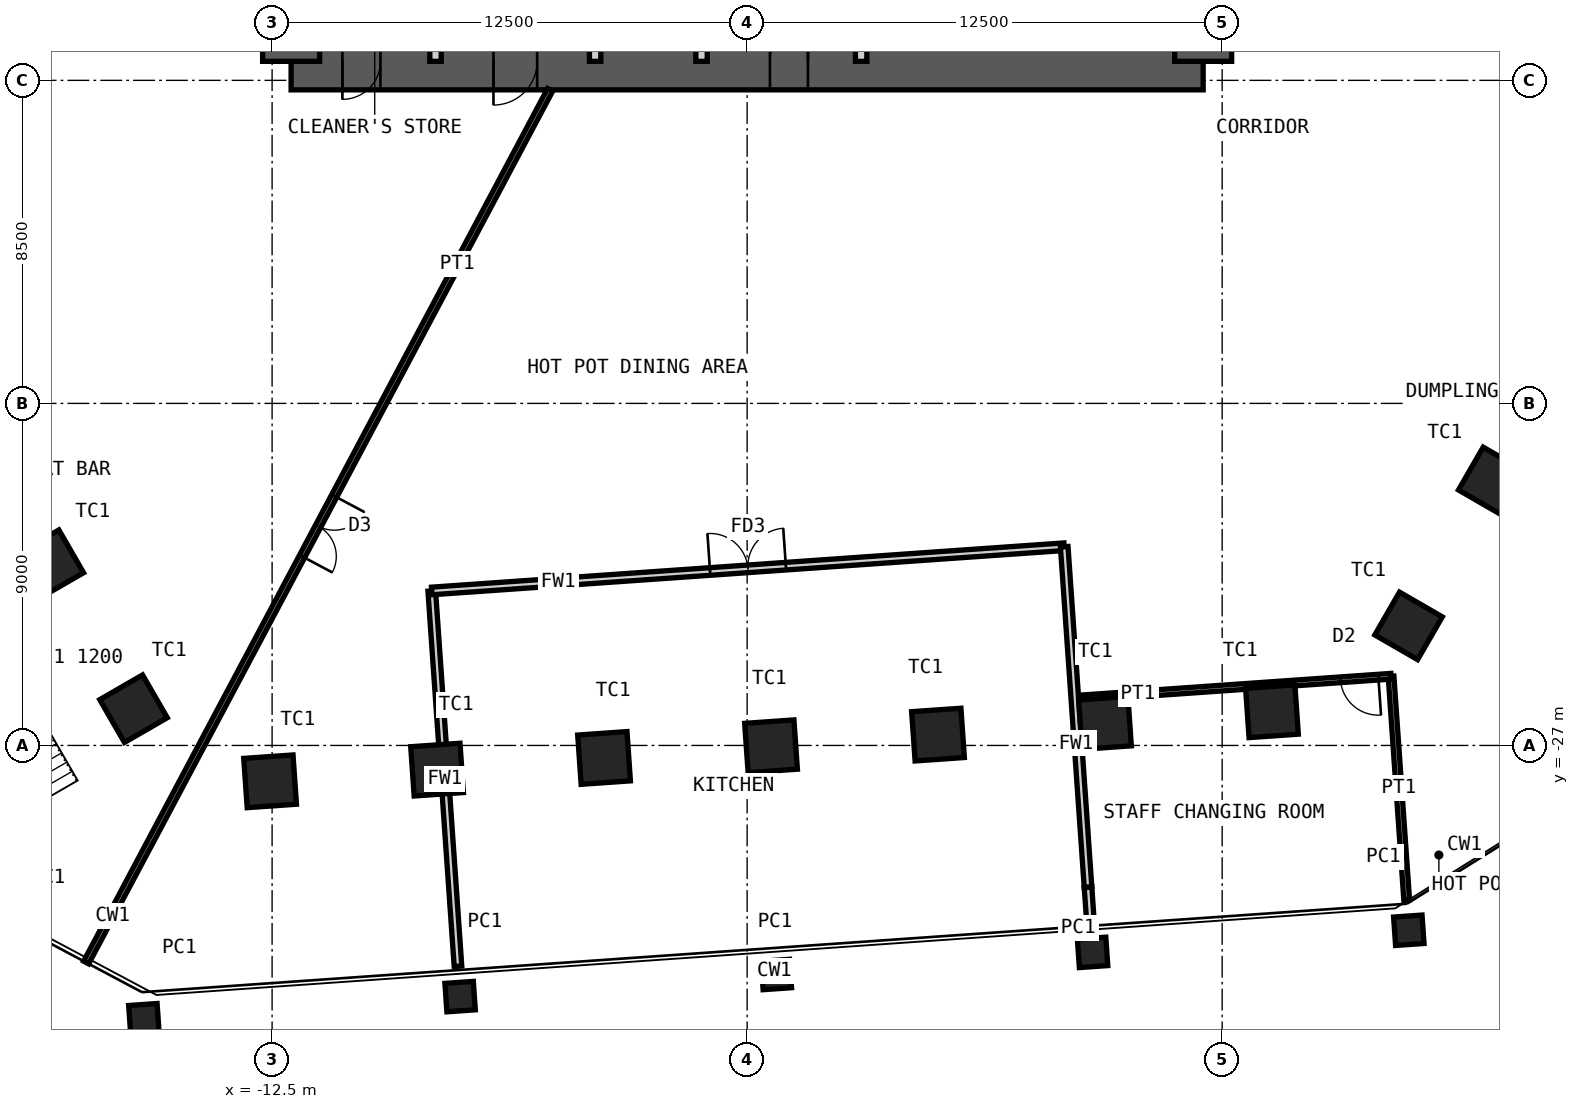
"""IFC4 building model, lengths in metres.
Left out: names, types, materials, properties, quantities, classifications, styles, units other than length and angle.
Written with IfcOpenShell. Run it as: python <this file> out.ifc"""

import sys

from ifc_helpers import new_model, si_unit, direction, frame, frame_2d, origin, origin_2d, place, context, subcontext, project, spatial, rectangle, hollow_rectangle, extrude, element, fill, save


model = new_model("IFC4")
c1 = context("Model", 3, precision=1e-05, world=origin(), true_north=direction((0.0, 1.0)))
c2 = subcontext(c1, "Body", "Model", "MODEL_VIEW")
j1 = project(units=[si_unit("LENGTHUNIT", "METRE"), si_unit("PLANEANGLEUNIT", "RADIAN")], contexts=[c1])
p1 = place(None, origin())
s1 = spatial("IfcSite", under=j1, at=p1, CompositionType="ELEMENT")
p2 = place(p1, origin())
s2 = spatial("IfcBuilding", under=s1, at=p2, CompositionType="ELEMENT")
p3 = place(p2, frame((0.0, 0.0, 6.0)))
s3 = spatial("IfcBuildingStorey", under=s2, at=p3, CompositionType="ELEMENT", Elevation=6.0)
for number, where, z_axis, x_axis in (
    (1, (19.607, -20.04, 0.0), (0.0, 0.0, 1.0), (0.5, 0.866, 0.0)),
    (2, (17.405, -23.854, 0.0), (0.0, 0.0, 1.0), (0.5, 0.866, 0.0)),
    (3, (13.811, -26.1, 0.0), (0.0, 0.0, 1.0), (0.998, 0.07, 0.0)),
    (4, (9.417, -26.407, 0.0), (0.0, 0.0, 1.0), (0.998, 0.07, 0.0)),
    (5, (5.023, -26.715, 0.0), (0.0, 0.0, 1.0), (0.998, 0.07, 0.0)),
    (6, (0.629, -27.022, 0.0), (0.0, 0.0, 1.0), (0.998, 0.07, 0.0)),
    (7, (-3.765, -27.329, 0.0), (0.0, 0.0, 1.0), (0.998, 0.07, 0.0)),
    (8, (-8.159, -27.636, 0.0), (0.0, 0.0, 1.0), (0.998, 0.07, 0.0)),
    (9, (-12.553, -27.944, 0.0), (0.0, 0.0, 1.0), (0.998, 0.07, 0.0)),
    (10, (-16.147, -26.033, 0.0), (0.0, 0.0, 1.0), (0.5, -0.866, 0.0)),
    (11, (-18.349, -22.218, 0.0), (0.0, 0.0, 1.0), (0.5, -0.866, 0.0)),
):
    element("IfcColumn", number, at=place(p3, frame(where, z_axis=z_axis, x_axis=x_axis)), inside=s3, PredefinedType="COLUMN", context=c2, shape_type="SweptSolid", body=[
        extrude(hollow_rectangle(XDim=1.3, YDim=1.3, WallThickness=0.1, at=origin_2d()), origin(), (0.0, 0.0, 1.0), 6.0),
    ])
for number, where, z_axis, x_axis in (
    (12, (17.411, -31.863, 0.0), (0.0, 0.0, 1.0), (0.998, 0.07, 0.0)),
    (13, (9.09, -32.445, 0.0), (0.0, 0.0, 1.0), (0.998, 0.07, 0.0)),
    (14, (0.769, -33.027, 0.0), (0.0, 0.0, 1.0), (0.998, 0.07, 0.0)),
    (15, (-7.553, -33.609, 0.0), (0.0, 0.0, 1.0), (0.998, 0.07, 0.0)),
    (16, (-15.874, -34.191, 0.0), (0.0, 0.0, 1.0), (0.998, 0.07, 0.0)),
):
    element("IfcColumn", number, at=place(p3, frame(where, z_axis=z_axis, x_axis=x_axis)), inside=s3, PredefinedType="COLUMN", context=c2, shape_type="SweptSolid", body=[
        extrude(hollow_rectangle(XDim=0.75, YDim=0.75, WallThickness=0.036, at=origin_2d()), origin(), (0.0, 0.0, 1.0), 6.0),
    ])
p4 = place(p3, frame((-12.0, -9.0, 0.0), z_axis=(0.0, 0.0, 1.0), x_axis=(1.0, 0.0, 0.0)))
e17 = element("IfcWall", 17, at=p4, inside=s3, PredefinedType="SHEAR", context=c2, shape_type="SweptSolid", body=[
    extrude(rectangle(XDim=24.0, YDim=1.5, at=frame_2d((12.0, 0.0))), origin(), (0.0, 0.0, 1.0), 6.0),
])
p5 = place(p4, frame((1.35, 0.0, 0.0)))
e18 = element("IfcOpeningElement", 18, at=p5, cuts=e17, PredefinedType="OPENING", context=c2, shape_type="SweptSolid", body=[
    extrude(rectangle(XDim=1.0, YDim=2.1, at=frame_2d((0.5, 1.05))), frame((0.0, 0.76, 0.0), z_axis=(0.0, -1.0, 0.0), x_axis=(1.0, 0.0, 0.0)), (0.0, 0.0, 1.0), 1.52),
])
p6 = place(p4, frame((5.325, 0.0, 0.0)))
e19 = element("IfcOpeningElement", 19, at=p6, cuts=e17, PredefinedType="OPENING", context=c2, shape_type="SweptSolid", body=[
    extrude(rectangle(XDim=1.15, YDim=2.1, at=frame_2d((0.575, 1.05))), frame((0.0, 0.76, 0.0), z_axis=(0.0, -1.0, 0.0), x_axis=(1.0, 0.0, 0.0)), (0.0, 0.0, 1.0), 1.52),
])
p7 = place(p4, frame((12.6, 0.0, 0.0)))
e20 = element("IfcOpeningElement", 20, at=p7, cuts=e17, PredefinedType="OPENING", context=c2, shape_type="SweptSolid", body=[
    extrude(rectangle(XDim=1.0, YDim=2.1, at=frame_2d((0.5, 1.05))), frame((0.0, 0.76, 0.0), z_axis=(0.0, -1.0, 0.0), x_axis=(1.0, 0.0, 0.0)), (0.0, 0.0, 1.0), 1.52),
])
p8 = place(p3, frame((12.0, -9.0, 0.0), z_axis=(0.0, 0.0, 1.0), x_axis=(0.0, 1.0, 0.0)))
e21 = element("IfcWall", 21, at=p8, inside=s3, PredefinedType="SHEAR", context=c2, shape_type="SweptSolid", body=[
    extrude(rectangle(XDim=18.0, YDim=1.5, at=frame_2d((9.0, 0.0))), origin(), (0.0, 0.0, 1.0), 6.0),
])
p9 = place(p8, frame((8.1, 0.0, 0.0)))
e22 = element("IfcOpeningElement", 22, at=p9, cuts=e21, PredefinedType="OPENING", context=c2, shape_type="SweptSolid", body=[
    extrude(rectangle(XDim=1.8, YDim=2.1, at=frame_2d((0.9, 1.05))), frame((0.0, 0.76, 0.0), z_axis=(0.0, -1.0, 0.0), x_axis=(1.0, 0.0, 0.0)), (0.0, 0.0, 1.0), 1.52),
])
p10 = place(p3, frame((-12.0, -9.0, 0.0), z_axis=(0.0, 0.0, 1.0), x_axis=(0.0, 1.0, 0.0)))
e23 = element("IfcWall", 23, at=p10, inside=s3, PredefinedType="SHEAR", context=c2, shape_type="SweptSolid", body=[
    extrude(rectangle(XDim=18.0, YDim=1.5, at=frame_2d((9.0, 0.0))), origin(), (0.0, 0.0, 1.0), 6.0),
])
p11 = place(p10, frame((8.1, 0.0, 0.0)))
e24 = element("IfcOpeningElement", 24, at=p11, cuts=e23, PredefinedType="OPENING", context=c2, shape_type="SweptSolid", body=[
    extrude(rectangle(XDim=1.8, YDim=2.1, at=frame_2d((0.9, 1.05))), frame((0.0, 0.76, 0.0), z_axis=(0.0, -1.0, 0.0), x_axis=(1.0, 0.0, 0.0)), (0.0, 0.0, 1.0), 1.52),
])
for number, where, z_axis, x_axis in (
    (25, (-8.2, -9.0, 0.0), (0.0, 0.0, 1.0), (0.0, 1.0, 0.0)),
    (26, (-4.0, -9.0, 0.0), (0.0, 0.0, 1.0), (0.0, 1.0, 0.0)),
):
    element("IfcWall", number, at=place(p3, frame(where, z_axis=z_axis, x_axis=x_axis)), inside=s3, PredefinedType="PARTITIONING", context=c2, shape_type="SweptSolid", body=[
        extrude(rectangle(XDim=3.85, YDim=0.3, at=frame_2d((1.925, 0.0))), origin(), (0.0, 0.0, 1.0), 5.78),
    ])
p12 = place(p3, frame((-1.2, -9.0, 0.0), z_axis=(0.0, 0.0, 1.0), x_axis=(0.0, 1.0, 0.0)))
e27 = element("IfcWall", 27, at=p12, inside=s3, PredefinedType="PARTITIONING", context=c2, shape_type="SweptSolid", body=[
    extrude(rectangle(XDim=3.85, YDim=0.3, at=frame_2d((1.925, 0.0))), origin(), (0.0, 0.0, 1.0), 5.78),
])
p13 = place(p12, frame((1.375, 0.0, 0.0)))
e28 = element("IfcOpeningElement", 28, at=p13, cuts=e27, PredefinedType="OPENING", context=c2, shape_type="SweptSolid", body=[
    extrude(rectangle(XDim=1.1, YDim=2.4, at=frame_2d((0.55, 1.2))), frame((0.0, 0.16, 0.0), z_axis=(0.0, -1.0, 0.0), x_axis=(1.0, 0.0, 0.0)), (0.0, 0.0, 1.0), 0.32),
])
p14 = place(p3, frame((3.0, -9.0, 0.0), z_axis=(0.0, 0.0, 1.0), x_axis=(0.0, 1.0, 0.0)))
e29 = element("IfcWall", 29, at=p14, inside=s3, PredefinedType="PARTITIONING", context=c2, shape_type="SweptSolid", body=[
    extrude(rectangle(XDim=3.85, YDim=0.3, at=frame_2d((1.925, 0.0))), origin(), (0.0, 0.0, 1.0), 5.78),
])
p15 = place(p14, frame((1.425, 0.0, 0.0)))
e30 = element("IfcOpeningElement", 30, at=p15, cuts=e29, PredefinedType="OPENING", context=c2, shape_type="SweptSolid", body=[
    extrude(rectangle(XDim=1.0, YDim=2.1, at=frame_2d((0.5, 1.05))), frame((0.0, 0.16, 0.0), z_axis=(0.0, -1.0, 0.0), x_axis=(1.0, 0.0, 0.0)), (0.0, 0.0, 1.0), 0.32),
])
p16 = place(p3, frame((9.034, -31.647, 0.0), z_axis=(0.0, 0.0, 1.0), x_axis=(-0.069837025026, 0.997558414297, 0.0)))
e31 = element("IfcWall", 31, at=p16, inside=s3, PredefinedType="PARTITIONING", context=c2, shape_type="SweptSolid", body=[
    extrude(rectangle(XDim=0.923, YDim=0.2, at=frame_2d((0.461, 0.0))), origin(), (0.0, 0.0, 1.0), 4.65),
])
p17 = place(p3, frame((-7.609, -32.811, 0.0), z_axis=(0.0, 0.0, 1.0), x_axis=(-0.069764341483, 0.997563500063, 0.0)))
e32 = element("IfcWall", 32, at=p17, inside=s3, PredefinedType="PARTITIONING", context=c2, shape_type="SweptSolid", body=[
    extrude(rectangle(XDim=9.9, YDim=0.2, at=frame_2d((4.95, 0.0))), origin(), (0.0, 0.0, 1.0), 5.75),
])
p18 = place(p3, frame((8.344, -21.771, 0.0), z_axis=(0.0, 0.0, 1.0), x_axis=(-0.997563959397, -0.069757773133, 0.0)))
e33 = element("IfcWall", 33, at=p18, inside=s3, PredefinedType="PARTITIONING", context=c2, shape_type="SweptSolid", body=[
    extrude(rectangle(XDim=16.684, YDim=0.2, at=frame_2d((8.342, 0.0))), origin(), (0.0, 0.0, 1.0), 5.75),
])
p19 = place(p18, frame((7.342, 0.0, 0.0)))
e34 = element("IfcOpeningElement", 34, at=p19, cuts=e33, PredefinedType="OPENING", context=c2, shape_type="SweptSolid", body=[
    extrude(rectangle(XDim=2.0, YDim=2.4, at=frame_2d((1.0, 1.2))), frame((0.0, 0.11, 0.0), z_axis=(0.0, -1.0, 0.0), x_axis=(1.0, 0.0, 0.0)), (0.0, 0.0, 1.0), 0.22),
])
p20 = place(p3, frame((17.356, -31.065, 0.0), z_axis=(0.0, 0.0, 1.0), x_axis=(-0.069767771051, 0.997563260211, 0.0)))
e35 = element("IfcWall", 35, at=p20, inside=s3, PredefinedType="PARTITIONING", context=c2, shape_type="SweptSolid", body=[
    extrude(rectangle(XDim=5.9, YDim=0.15, at=frame_2d((2.95, 0.0))), origin(), (0.0, 0.0, 1.0), 5.75),
])
p21 = place(p3, frame((16.944, -25.179, 0.0), z_axis=(0.0, 0.0, 1.0), x_axis=(-0.997564977604, -0.069743210844, 0.0)))
e36 = element("IfcWall", 36, at=p21, inside=s3, PredefinedType="PARTITIONING", context=c2, shape_type="SweptSolid", body=[
    extrude(rectangle(XDim=8.342, YDim=0.15, at=frame_2d((4.171, 0.0))), origin(), (0.0, 0.0, 1.0), 5.75),
])
p22 = place(p21, frame((0.334, 0.0, 0.0)))
e37 = element("IfcOpeningElement", 37, at=p22, cuts=e36, PredefinedType="OPENING", context=c2, shape_type="SweptSolid", body=[
    extrude(rectangle(XDim=1.0, YDim=2.4, at=frame_2d((0.5, 1.2))), frame((0.0, 0.085, 0.0), z_axis=(0.0, -1.0, 0.0), x_axis=(1.0, 0.0, 0.0)), (0.0, 0.0, 1.0), 0.17),
])
p23 = place(p3, frame((-5.184, -9.75, 0.0), z_axis=(0.0, 0.0, 1.0), x_axis=(-0.469477354847, -0.882944513141, 0.0)))
e38 = element("IfcWall", 38, at=p23, inside=s3, PredefinedType="PARTITIONING", context=c2, shape_type="SweptSolid", body=[
    extrude(rectangle(XDim=26.005, YDim=0.15, at=frame_2d((13.002, 0.0))), origin(), (0.0, 0.0, 1.0), 5.75),
])
p24 = place(p23, frame((12.103, 0.0, 0.0)))
e39 = element("IfcOpeningElement", 39, at=p24, cuts=e38, PredefinedType="OPENING", context=c2, shape_type="SweptSolid", body=[
    extrude(rectangle(XDim=1.8, YDim=2.4, at=frame_2d((0.9, 1.2))), frame((0.0, 0.085, 0.0), z_axis=(0.0, -1.0, 0.0), x_axis=(1.0, 0.0, 0.0)), (0.0, 0.0, 1.0), 0.17),
])
p25 = place(p3, frame((8.97, -30.726, 0.0), z_axis=(0.0, 0.0, 1.0), x_axis=(-0.069729805766, 0.997565914708, 0.0)))
e40 = element("IfcWall", 40, at=p25, inside=s3, PredefinedType="PARTITIONING", context=c2, shape_type="SweptSolid", body=[
    extrude(rectangle(XDim=8.977, YDim=0.2, at=frame_2d((4.489, 0.0))), origin(), (0.0, 0.0, 1.0), 5.75),
])
p26 = place(p5, origin())
e41 = element("IfcDoor", 41, at=p26, inside=s3, OperationType="SINGLE_SWING_LEFT", PredefinedType="DOOR", context=c2, shape_type="SweptSolid", body=[
    extrude(rectangle(XDim=1.0, YDim=2.1, at=frame_2d((0.5, 1.05))), frame((0.0, 0.025, 0.0), z_axis=(0.0, -1.0, 0.0), x_axis=(1.0, 0.0, 0.0)), (0.0, 0.0, 1.0), 0.05),
])
fill(e18, e41)
p27 = place(p6, origin())
e42 = element("IfcDoor", 42, at=p27, inside=s3, OperationType="SINGLE_SWING_LEFT", PredefinedType="DOOR", context=c2, shape_type="SweptSolid", body=[
    extrude(rectangle(XDim=1.15, YDim=2.1, at=frame_2d((0.575, 1.05))), frame((0.0, 0.025, 0.0), z_axis=(0.0, -1.0, 0.0), x_axis=(1.0, 0.0, 0.0)), (0.0, 0.0, 1.0), 0.05),
])
fill(e19, e42)
p28 = place(p7, origin())
e43 = element("IfcDoor", 43, at=p28, inside=s3, OperationType="SINGLE_SWING_LEFT", PredefinedType="DOOR", context=c2, shape_type="SweptSolid", body=[
    extrude(rectangle(XDim=1.0, YDim=2.1, at=frame_2d((0.5, 1.05))), frame((0.0, 0.025, 0.0), z_axis=(0.0, -1.0, 0.0), x_axis=(1.0, 0.0, 0.0)), (0.0, 0.0, 1.0), 0.05),
])
fill(e20, e43)
p29 = place(p19, origin())
e44 = element("IfcDoor", 44, at=p29, inside=s3, OperationType="DOUBLE_DOOR_DOUBLE_SWING", PredefinedType="DOOR", context=c2, shape_type="SweptSolid", body=[
    extrude(rectangle(XDim=2.0, YDim=2.4, at=frame_2d((1.0, 1.2))), frame((0.0, 0.025, 0.0), z_axis=(0.0, -1.0, 0.0), x_axis=(1.0, 0.0, 0.0)), (0.0, 0.0, 1.0), 0.05),
])
fill(e34, e44)
p30 = place(p22, origin())
e45 = element("IfcDoor", 45, at=p30, inside=s3, OperationType="SINGLE_SWING_RIGHT", PredefinedType="DOOR", context=c2, shape_type="SweptSolid", body=[
    extrude(rectangle(XDim=1.0, YDim=2.4, at=frame_2d((0.5, 1.2))), frame((0.0, 0.025, 0.0), z_axis=(0.0, -1.0, 0.0), x_axis=(1.0, 0.0, 0.0)), (0.0, 0.0, 1.0), 0.05),
])
fill(e37, e45)
p31 = place(p24, origin())
e46 = element("IfcDoor", 46, at=p31, inside=s3, OperationType="DOUBLE_DOOR_DOUBLE_SWING", PredefinedType="DOOR", context=c2, shape_type="SweptSolid", body=[
    extrude(rectangle(XDim=1.8, YDim=2.4, at=frame_2d((0.9, 1.2))), frame((0.0, 0.025, 0.0), z_axis=(0.0, -1.0, 0.0), x_axis=(1.0, 0.0, 0.0)), (0.0, 0.0, 1.0), 0.05),
])
fill(e39, e46)
save(model, sys.argv[1])
